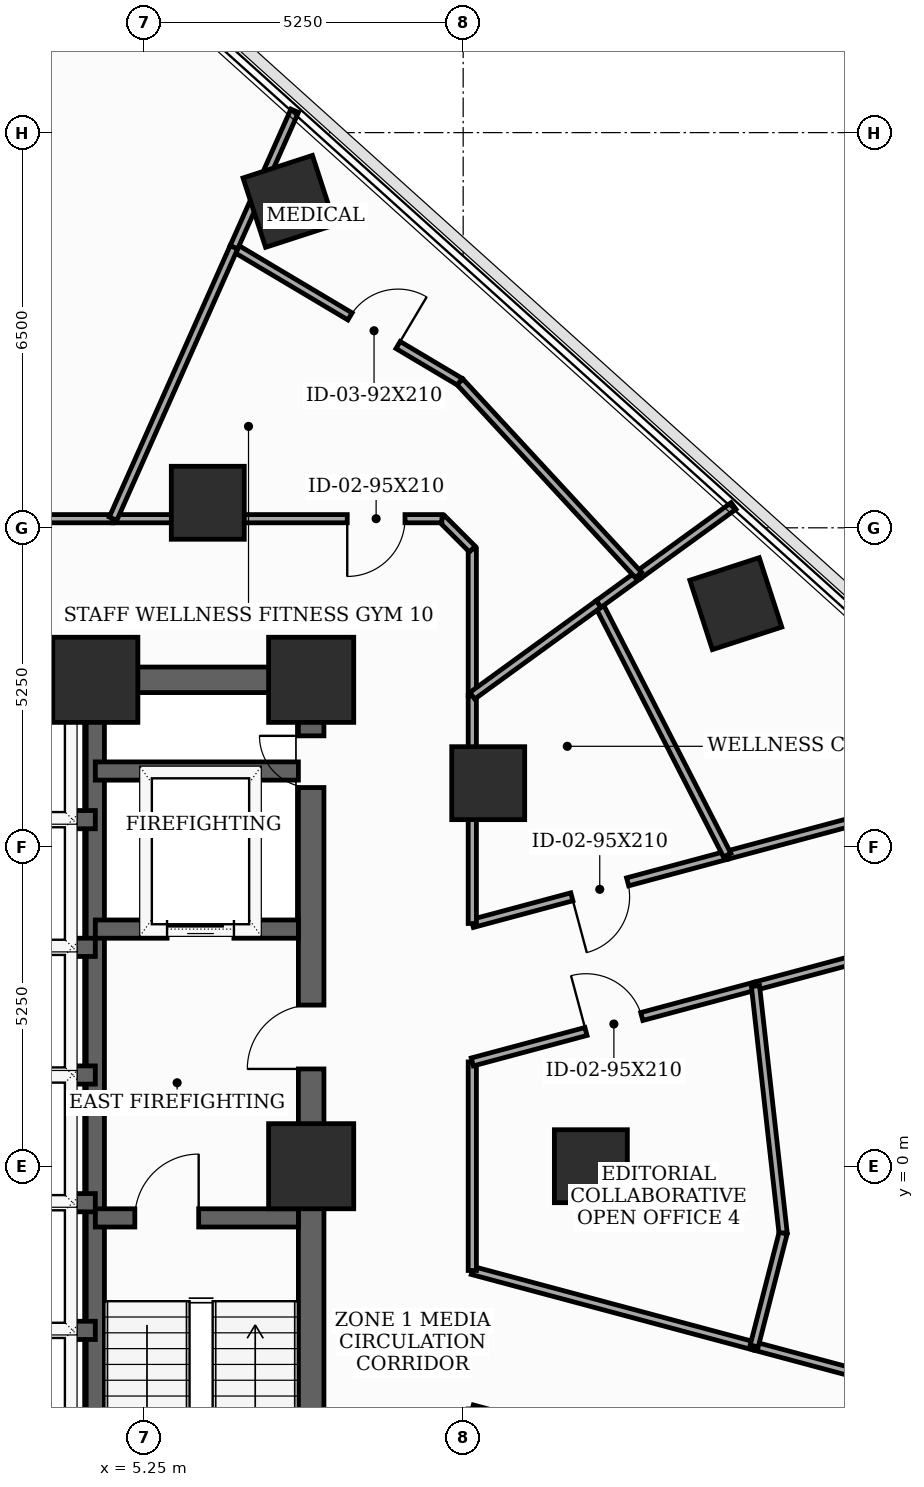
"""IFC4 building model, lengths in metres.
Left out: names, types, materials, properties, quantities, classifications, styles, units other than length and angle.
Written with IfcOpenShell. Run it as: python <this file> out.ifc"""

import sys

from ifc_helpers import new_model, si_unit, direction, frame, frame_2d, origin, origin_2d, place, context, subcontext, project, spatial, rectangle, extrude, element, fill, save


model = new_model("IFC4")
c1 = context("Model", 3, precision=1e-05, world=origin(), true_north=direction((0.0, 1.0)))
c2 = subcontext(c1, "Body", "Model", "MODEL_VIEW")
j1 = project(units=[si_unit("LENGTHUNIT", "METRE"), si_unit("PLANEANGLEUNIT", "RADIAN")], contexts=[c1])
p1 = place(None, origin())
s1 = spatial("IfcSite", under=j1, at=p1, CompositionType="ELEMENT")
p2 = place(p1, origin())
s2 = spatial("IfcBuilding", under=s1, at=p2, CompositionType="ELEMENT")
p3 = place(p2, frame((0.0, 0.0, 105.1)))
s3 = spatial("IfcBuildingStorey", under=s2, at=p3, CompositionType="ELEMENT", Elevation=105.1)
for number, where, z_axis, x_axis in (
    (1, (8.0, 0.0, 0.0), (0.0, 0.0, 1.0), (1.0, 0.0, 0.0)),
    (2, (8.0, 8.0, 0.0), (0.0, 0.0, 1.0), (1.0, 0.0, 0.0)),
    (3, (4.45, 8.0, 0.0), (0.0, 0.0, 1.0), (1.0, 0.0, 0.0)),
):
    element("IfcColumn", number, at=place(p3, frame(where, z_axis=z_axis, x_axis=x_axis)), inside=s3, PredefinedType="COLUMN", context=c2, shape_type="SweptSolid", body=[
        extrude(rectangle(XDim=1.4, YDim=1.4, at=origin_2d()), origin(), (0.0, 0.0, 1.0), 3.7),
    ])
for number, where, z_axis, x_axis in (
    (4, (12.6, 0.0, 0.0), (0.0, 0.0, 1.0), (1.0, 0.0, 0.0)),
    (5, (10.912, 6.3, 0.0), (0.0, 0.0, 1.0), (1.0, 0.0, 0.0)),
    (6, (6.3, 10.912, 0.0), (0.0, 0.0, 1.0), (1.0, 0.0, 0.0)),
    (7, (14.984, 9.252, 0.0), (0.0, 0.0, 1.0), (0.951, 0.309, 0.0)),
    (8, (7.635, 15.869, 0.0), (0.0, 0.0, 1.0), (0.951, 0.309, 0.0)),
):
    element("IfcColumn", number, at=place(p3, frame(where, z_axis=z_axis, x_axis=x_axis)), inside=s3, PredefinedType="COLUMN", context=c2, shape_type="SweptSolid", body=[
        extrude(rectangle(XDim=1.2, YDim=1.2, at=origin_2d()), origin(), (0.0, 0.0, 1.0), 3.7),
    ])
p4 = place(p3, frame((8.0, -8.0, 0.0), z_axis=(0.0, 0.0, 1.0), x_axis=(0.0, 1.0, 0.0)))
e9 = element("IfcWall", 9, at=p4, inside=s3, PredefinedType="SHEAR", context=c2, shape_type="SweptSolid", body=[
    extrude(rectangle(XDim=16.0, YDim=0.42, at=frame_2d((8.0, 0.0))), origin(), (0.0, 0.0, 1.0), 3.5),
])
p5 = place(p4, frame((9.6, 0.0, 0.0)))
e10 = element("IfcOpeningElement", 10, at=p5, cuts=e9, PredefinedType="OPENING", context=c2, shape_type="SweptSolid", body=[
    extrude(rectangle(XDim=1.05, YDim=2.15, at=frame_2d((0.525, 1.075))), frame((0.0, 0.22, 0.0), z_axis=(0.0, -1.0, 0.0), x_axis=(1.0, 0.0, 0.0)), (0.0, 0.0, 1.0), 0.44),
])
p6 = place(p4, frame((14.229, 0.0, 0.0)))
e11 = element("IfcOpeningElement", 11, at=p6, cuts=e9, PredefinedType="OPENING", context=c2, shape_type="SweptSolid", body=[
    extrude(rectangle(XDim=0.85, YDim=2.02, at=frame_2d((0.425, 1.01))), frame((0.0, 0.22, 0.0), z_axis=(0.0, -1.0, 0.0), x_axis=(1.0, 0.0, 0.0)), (0.0, 0.0, 1.0), 0.44),
])
p7 = place(p3, frame((-8.0, 8.0, 0.0), z_axis=(0.0, 0.0, 1.0), x_axis=(1.0, 0.0, 0.0)))
e12 = element("IfcWall", 12, at=p7, inside=s3, PredefinedType="SHEAR", context=c2, shape_type="SweptSolid", body=[
    extrude(rectangle(XDim=16.0, YDim=0.42, at=frame_2d((8.0, 0.0))), origin(), (0.0, 0.0, 1.0), 3.5),
])
p8 = place(p7, frame((7.1, 0.0, 0.0)))
e13 = element("IfcOpeningElement", 13, at=p8, cuts=e12, PredefinedType="OPENING", context=c2, shape_type="SweptSolid", body=[
    extrude(rectangle(XDim=1.8, YDim=2.15, at=frame_2d((0.9, 1.075))), frame((0.0, 0.22, 0.0), z_axis=(0.0, -1.0, 0.0), x_axis=(1.0, 0.0, 0.0)), (0.0, 0.0, 1.0), 0.44),
])
p9 = place(p3, frame((4.45, -7.79, 0.0), z_axis=(0.0, 0.0, 1.0), x_axis=(0.0, 1.0, 0.0)))
e14 = element("IfcWall", 14, at=p9, inside=s3, PredefinedType="SHEAR", context=c2, shape_type="SweptSolid", body=[
    extrude(rectangle(XDim=15.58, YDim=0.3, at=frame_2d((7.79, 0.0))), origin(), (0.0, 0.0, 1.0), 3.5),
])
p10 = place(p3, frame((4.45, -0.85, 0.0), z_axis=(0.0, 0.0, 1.0), x_axis=(1.0, 0.0, 0.0)))
e15 = element("IfcWall", 15, at=p10, inside=s3, PredefinedType="SHEAR", context=c2, shape_type="SweptSolid", body=[
    extrude(rectangle(XDim=3.34, YDim=0.3, at=frame_2d((1.67, 0.0))), origin(), (0.0, 0.0, 1.0), 3.5),
])
p11 = place(p10, frame((0.65, 0.0, 0.0)))
e16 = element("IfcOpeningElement", 16, at=p11, cuts=e15, PredefinedType="OPENING", context=c2, shape_type="SweptSolid", body=[
    extrude(rectangle(XDim=1.05, YDim=2.15, at=frame_2d((0.525, 1.075))), frame((0.0, 0.16, 0.0), z_axis=(0.0, -1.0, 0.0), x_axis=(1.0, 0.0, 0.0)), (0.0, 0.0, 1.0), 0.32),
])
p12 = place(p3, frame((4.45, 3.9, 0.0), z_axis=(0.0, 0.0, 1.0), x_axis=(1.0, 0.0, 0.0)))
e17 = element("IfcWall", 17, at=p12, inside=s3, PredefinedType="SHEAR", context=c2, shape_type="SweptSolid", body=[
    extrude(rectangle(XDim=3.34, YDim=0.3, at=frame_2d((1.67, 0.0))), origin(), (0.0, 0.0, 1.0), 3.5),
])
p13 = place(p12, frame((1.18, 0.0, 0.0)))
e18 = element("IfcOpeningElement", 18, at=p13, cuts=e17, PredefinedType="OPENING", context=c2, shape_type="SweptSolid", body=[
    extrude(rectangle(XDim=1.1, YDim=2.1, at=frame_2d((0.55, 1.05))), frame((0.0, 0.16, 0.0), z_axis=(0.0, -1.0, 0.0), x_axis=(1.0, 0.0, 0.0)), (0.0, 0.0, 1.0), 0.32),
])
p14 = place(p3, frame((4.45, 6.5, 0.0), z_axis=(0.0, 0.0, 1.0), x_axis=(1.0, 0.0, 0.0)))
e19 = element("IfcWall", 19, at=p14, inside=s3, PredefinedType="SHEAR", context=c2, shape_type="SweptSolid", body=[
    extrude(rectangle(XDim=3.34, YDim=0.3, at=frame_2d((1.67, 0.0))), origin(), (0.0, 0.0, 1.0), 3.5),
])
for number, where, z_axis, x_axis in (
    (20, (1.68, 1.5, 0.0), (0.0, 0.0, 1.0), (1.0, 0.0, 0.0)),
    (21, (1.68, 3.6, 0.0), (0.0, 0.0, 1.0), (1.0, 0.0, 0.0)),
    (22, (1.68, 5.7, 0.0), (0.0, 0.0, 1.0), (1.0, 0.0, 0.0)),
    (23, (1.68, -2.7, 0.0), (0.0, 0.0, 1.0), (1.0, 0.0, 0.0)),
    (24, (1.68, -0.6, 0.0), (0.0, 0.0, 1.0), (1.0, 0.0, 0.0)),
):
    element("IfcWall", number, at=place(p3, frame(where, z_axis=z_axis, x_axis=x_axis)), inside=s3, PredefinedType="SHEAR", context=c2, shape_type="SweptSolid", body=[
        extrude(rectangle(XDim=2.77, YDim=0.3, at=frame_2d((1.385, 0.0))), origin(), (0.0, 0.0, 1.0), 3.5),
    ])
p15 = place(p3, frame((22.115, -4.787, 0.0), z_axis=(0.0, 0.0, 1.0), x_axis=(-0.965917838763, 0.258848853116, 0.0)))
e25 = element("IfcWall", 25, at=p15, inside=s3, PredefinedType="PARTITIONING", context=c2, shape_type="SweptSolid", body=[
    extrude(rectangle(XDim=7.07, YDim=0.135, at=frame_2d((3.535, 0.0))), origin(), (0.0, 0.0, 1.0), 2.935),
])
p16 = place(p15, frame((3.06, 0.0, 0.0)))
e26 = element("IfcOpeningElement", 26, at=p16, cuts=e25, PredefinedType="OPENING", context=c2, shape_type="SweptSolid", body=[
    extrude(rectangle(XDim=0.95, YDim=2.1, at=frame_2d((0.475, 1.05))), frame((0.0, 0.077, 0.0), z_axis=(0.0, -1.0, 0.0), x_axis=(1.0, 0.0, 0.0)), (0.0, 0.0, 1.0), 0.155),
])
p17 = place(p3, frame((15.307, 2.963, 0.0), z_axis=(0.0, 0.0, 1.0), x_axis=(0.965966165677, 0.258668449501, 0.0)))
e27 = element("IfcWall", 27, at=p17, inside=s3, PredefinedType="PARTITIONING", context=c2, shape_type="SweptSolid", body=[
    extrude(rectangle(XDim=3.248, YDim=0.135, at=frame_2d((1.624, 0.0))), origin(), (0.0, 0.0, 1.0), 3.125),
])
p18 = place(p3, frame((17.875, 5.928, 0.0), z_axis=(0.0, 0.0, 1.0), x_axis=(-0.96597893007, -0.258620777704, 0.0)))
e28 = element("IfcWall", 28, at=p18, inside=s3, PredefinedType="PARTITIONING", context=c2, shape_type="SweptSolid", body=[
    extrude(rectangle(XDim=3.14, YDim=0.135, at=frame_2d((1.57, 0.0))), origin(), (0.0, 0.0, 1.0), 3.125),
])
p19 = place(p3, frame((10.65, -3.992, 0.0), z_axis=(0.0, 0.0, 1.0), x_axis=(0.965925146235, -0.258821583086, 0.0)))
e29 = element("IfcWall", 29, at=p19, inside=s3, PredefinedType="PARTITIONING", context=c2, shape_type="SweptSolid", body=[
    extrude(rectangle(XDim=4.234, YDim=0.135, at=frame_2d((2.117, 0.0))), origin(), (0.0, 0.0, 1.0), 2.785),
])
p20 = place(p3, frame((15.286, -2.957, 0.0), z_axis=(0.0, 0.0, 1.0), x_axis=(-0.965939651128, 0.258767444588, 0.0)))
e30 = element("IfcWall", 30, at=p20, inside=s3, PredefinedType="PARTITIONING", context=c2, shape_type="SweptSolid", body=[
    extrude(rectangle(XDim=4.8, YDim=0.135, at=frame_2d((2.4, 0.0))), origin(), (0.0, 0.0, 1.0), 2.785),
])
p21 = place(p3, frame((10.65, -1.715, 0.0), z_axis=(0.0, 0.0, 1.0), x_axis=(0.0, 1.0, 0.0)))
e31 = element("IfcWall", 31, at=p21, inside=s3, PredefinedType="PARTITIONING", context=c2, shape_type="SweptSolid", body=[
    extrude(rectangle(XDim=3.43, YDim=0.135, at=frame_2d((1.715, 0.0))), origin(), (0.0, 0.0, 1.0), 2.785),
])
p22 = place(p3, frame((10.65, 1.715, 0.0), z_axis=(0.0, 0.0, 1.0), x_axis=(0.965927482723, 0.258812863129, 0.0)))
e32 = element("IfcWall", 32, at=p22, inside=s3, PredefinedType="PARTITIONING", context=c2, shape_type="SweptSolid", body=[
    extrude(rectangle(XDim=4.821, YDim=0.135, at=frame_2d((2.411, 0.0))), origin(), (0.0, 0.0, 1.0), 2.785),
])
p23 = place(p22, frame((1.936, 0.0, 0.0)))
e33 = element("IfcOpeningElement", 33, at=p23, cuts=e32, PredefinedType="OPENING", context=c2, shape_type="SweptSolid", body=[
    extrude(rectangle(XDim=0.95, YDim=2.1, at=frame_2d((0.475, 1.05))), frame((0.0, 0.077, 0.0), z_axis=(0.0, -1.0, 0.0), x_axis=(1.0, 0.0, 0.0)), (0.0, 0.0, 1.0), 0.155),
])
p24 = place(p3, frame((14.842, 5.116, 0.0), z_axis=(0.0, 0.0, 1.0), x_axis=(-0.965883000332, -0.258978820891, 0.0)))
e34 = element("IfcWall", 34, at=p24, inside=s3, PredefinedType="PARTITIONING", context=c2, shape_type="SweptSolid", body=[
    extrude(rectangle(XDim=4.34, YDim=0.135, at=frame_2d((2.17, 0.0))), origin(), (0.0, 0.0, 1.0), 2.785),
])
p25 = place(p24, frame((1.695, 0.0, 0.0)))
e35 = element("IfcOpeningElement", 35, at=p25, cuts=e34, PredefinedType="OPENING", context=c2, shape_type="SweptSolid", body=[
    extrude(rectangle(XDim=0.95, YDim=2.1, at=frame_2d((0.475, 1.05))), frame((0.0, 0.077, 0.0), z_axis=(0.0, -1.0, 0.0), x_axis=(1.0, 0.0, 0.0)), (0.0, 0.0, 1.0), 0.155),
])
p26 = place(p3, frame((10.65, 3.992, 0.0), z_axis=(0.0, 0.0, 1.0), x_axis=(0.0, 1.0, 0.0)))
e36 = element("IfcWall", 36, at=p26, inside=s3, PredefinedType="PARTITIONING", context=c2, shape_type="SweptSolid", body=[
    extrude(rectangle(XDim=3.746, YDim=0.135, at=frame_2d((1.873, 0.0))), origin(), (0.0, 0.0, 1.0), 2.785),
])
p27 = place(p3, frame((10.65, 7.738, 0.0), z_axis=(0.0, 0.0, 1.0), x_axis=(0.0, 1.0, 0.0)))
e37 = element("IfcWall", 37, at=p27, inside=s3, PredefinedType="PARTITIONING", context=c2, shape_type="SweptSolid", body=[
    extrude(rectangle(XDim=2.412, YDim=0.135, at=frame_2d((1.206, 0.0))), origin(), (0.0, 0.0, 1.0), 3.125),
])
p28 = place(p3, frame((10.65, 10.15, 0.0), z_axis=(0.0, 0.0, 1.0), x_axis=(-0.707106781187, 0.707106781187, 0.0)))
e38 = element("IfcWall", 38, at=p28, inside=s3, PredefinedType="PARTITIONING", context=c2, shape_type="SweptSolid", body=[
    extrude(rectangle(XDim=0.707, YDim=0.135, at=frame_2d((0.354, 0.0))), origin(), (0.0, 0.0, 1.0), 3.125),
])
p29 = place(p3, frame((10.15, 10.65, 0.0), z_axis=(0.0, 0.0, 1.0), x_axis=(-1.0, 0.0, 0.0)))
e39 = element("IfcWall", 39, at=p29, inside=s3, PredefinedType="PARTITIONING", context=c2, shape_type="SweptSolid", body=[
    extrude(rectangle(XDim=5.408, YDim=0.135, at=frame_2d((2.704, 0.0))), origin(), (0.0, 0.0, 1.0), 2.785),
])
p30 = place(p29, frame((0.607, 0.0, 0.0)))
e40 = element("IfcOpeningElement", 40, at=p30, cuts=e39, PredefinedType="OPENING", context=c2, shape_type="SweptSolid", body=[
    extrude(rectangle(XDim=0.95, YDim=2.1, at=frame_2d((0.475, 1.05))), frame((0.0, 0.077, 0.0), z_axis=(0.0, -1.0, 0.0), x_axis=(1.0, 0.0, 0.0)), (0.0, 0.0, 1.0), 0.155),
])
p31 = place(p3, frame((4.742, 10.65, 0.0), z_axis=(0.0, 0.0, 1.0), x_axis=(-1.0, 0.0, 0.0)))
e41 = element("IfcWall", 41, at=p31, inside=s3, PredefinedType="PARTITIONING", context=c2, shape_type="SweptSolid", body=[
    extrude(rectangle(XDim=10.405, YDim=0.135, at=frame_2d((5.203, 0.0))), origin(), (0.0, 0.0, 1.0), 2.785),
])
p32 = place(p31, frame((5.976, 0.0, 0.0)))
e42 = element("IfcOpeningElement", 42, at=p32, cuts=e41, PredefinedType="OPENING", context=c2, shape_type="SweptSolid", body=[
    extrude(rectangle(XDim=0.95, YDim=2.1, at=frame_2d((0.475, 1.05))), frame((0.0, 0.077, 0.0), z_axis=(0.0, -1.0, 0.0), x_axis=(1.0, 0.0, 0.0)), (0.0, 0.0, 1.0), 0.155),
])
p33 = place(p3, frame((15.307, 2.963, 0.0), z_axis=(0.0, 0.0, 1.0), x_axis=(0.111256918124, -0.99379167745, 0.0)))
e43 = element("IfcWall", 43, at=p33, inside=s3, PredefinedType="PARTITIONING", context=c2, shape_type="SweptSolid", body=[
    extrude(rectangle(XDim=4.09, YDim=0.135, at=frame_2d((2.045, 0.0))), origin(), (0.0, 0.0, 1.0), 2.785),
])
p34 = place(p3, frame((15.762, -1.102, 0.0), z_axis=(0.0, 0.0, 1.0), x_axis=(-0.248590042538, -0.968608791386, 0.0)))
e44 = element("IfcWall", 44, at=p34, inside=s3, PredefinedType="PARTITIONING", context=c2, shape_type="SweptSolid", body=[
    extrude(rectangle(XDim=1.915, YDim=0.135, at=frame_2d((0.958, 0.0))), origin(), (0.0, 0.0, 1.0), 3.5),
])
p35 = place(p3, frame((12.726, 9.246, 0.0), z_axis=(0.0, 0.0, 1.0), x_axis=(0.455967351564, -0.889996502413, 0.0)))
e45 = element("IfcWall", 45, at=p35, inside=s3, PredefinedType="PARTITIONING", context=c2, shape_type="SweptSolid", body=[
    extrude(rectangle(XDim=4.641, YDim=0.135, at=frame_2d((2.32, 0.0))), origin(), (0.0, 0.0, 1.0), 2.785),
])
p36 = place(p3, frame((14.947, 10.86, 0.0), z_axis=(0.0, 0.0, 1.0), x_axis=(-0.809090948161, -0.58768345017, 0.0)))
e46 = element("IfcWall", 46, at=p36, inside=s3, PredefinedType="PARTITIONING", context=c2, shape_type="SweptSolid", body=[
    extrude(rectangle(XDim=1.933, YDim=0.135, at=frame_2d((0.967, 0.0))), origin(), (0.0, 0.0, 1.0), 2.935),
])
p37 = place(p3, frame((13.383, 9.724, 0.0), z_axis=(0.0, 0.0, 1.0), x_axis=(-0.808606124949, -0.588350350297, 0.0)))
e47 = element("IfcWall", 47, at=p37, inside=s3, PredefinedType="PARTITIONING", context=c2, shape_type="SweptSolid", body=[
    extrude(rectangle(XDim=0.812, YDim=0.135, at=frame_2d((0.406, 0.0))), origin(), (0.0, 0.0, 1.0), 3.5),
])
p38 = place(p3, frame((12.726, 9.246, 0.0), z_axis=(0.0, 0.0, 1.0), x_axis=(-0.80908565166, -0.587690742039, 0.0)))
e48 = element("IfcWall", 48, at=p38, inside=s3, PredefinedType="PARTITIONING", context=c2, shape_type="SweptSolid", body=[
    extrude(rectangle(XDim=2.566, YDim=0.135, at=frame_2d((1.283, 0.0))), origin(), (0.0, 0.0, 1.0), 3.125),
])
p39 = place(p3, frame((6.729, 15.113, 0.0), z_axis=(0.0, 0.0, 1.0), x_axis=(0.859389125663, -0.511322139841, 0.0)))
e49 = element("IfcWall", 49, at=p39, inside=s3, PredefinedType="PARTITIONING", context=c2, shape_type="SweptSolid", body=[
    extrude(rectangle(XDim=4.326, YDim=0.135, at=frame_2d((2.163, 0.0))), origin(), (0.0, 0.0, 1.0), 2.785),
])
p40 = place(p39, frame((2.222, 0.0, 0.0)))
e50 = element("IfcOpeningElement", 50, at=p40, cuts=e49, PredefinedType="OPENING", context=c2, shape_type="SweptSolid", body=[
    extrude(rectangle(XDim=0.92, YDim=2.1, at=frame_2d((0.46, 1.05))), frame((0.0, 0.077, 0.0), z_axis=(0.0, -1.0, 0.0), x_axis=(1.0, 0.0, 0.0)), (0.0, 0.0, 1.0), 0.155),
])
p41 = place(p3, frame((10.447, 12.901, 0.0), z_axis=(0.0, 0.0, 1.0), x_axis=(0.678734730072, -0.734383527997, 0.0)))
e51 = element("IfcWall", 51, at=p41, inside=s3, PredefinedType="PARTITIONING", context=c2, shape_type="SweptSolid", body=[
    extrude(rectangle(XDim=4.326, YDim=0.135, at=frame_2d((2.163, 0.0))), origin(), (0.0, 0.0, 1.0), 3.5),
])
p42 = place(p3, frame((7.729, 17.359, 0.0), z_axis=(0.0, 0.0, 1.0), x_axis=(-0.406728032322, -0.913549291349, 0.0)))
e52 = element("IfcWall", 52, at=p42, inside=s3, PredefinedType="PARTITIONING", context=c2, shape_type="SweptSolid", body=[
    extrude(rectangle(XDim=2.459, YDim=0.135, at=frame_2d((1.229, 0.0))), origin(), (0.0, 0.0, 1.0), 2.935),
])
p43 = place(p3, frame((6.729, 15.113, 0.0), z_axis=(0.0, 0.0, 1.0), x_axis=(-0.406727234472, -0.913549646565, 0.0)))
e53 = element("IfcWall", 53, at=p43, inside=s3, PredefinedType="PARTITIONING", context=c2, shape_type="SweptSolid", body=[
    extrude(rectangle(XDim=4.885, YDim=0.135, at=frame_2d((2.443, 0.0))), origin(), (0.0, 0.0, 1.0), 2.785),
])
p44 = place(p5, origin())
e54 = element("IfcDoor", 54, at=p44, inside=s3, OperationType="SINGLE_SWING_LEFT", PredefinedType="DOOR", context=c2, shape_type="SweptSolid", body=[
    extrude(rectangle(XDim=1.05, YDim=2.15, at=frame_2d((0.525, 1.075))), frame((0.0, 0.025, 0.0), z_axis=(0.0, -1.0, 0.0), x_axis=(1.0, 0.0, 0.0)), (0.0, 0.0, 1.0), 0.05),
])
fill(e10, e54)
p45 = place(p6, origin())
e55 = element("IfcDoor", 55, at=p45, inside=s3, OperationType="SINGLE_SWING_RIGHT", PredefinedType="TRAPDOOR", context=c2, shape_type="SweptSolid", body=[
    extrude(rectangle(XDim=0.85, YDim=2.02, at=frame_2d((0.425, 1.01))), frame((0.0, 0.025, 0.0), z_axis=(0.0, -1.0, 0.0), x_axis=(1.0, 0.0, 0.0)), (0.0, 0.0, 1.0), 0.05),
])
fill(e11, e55)
p46 = place(p11, origin())
e56 = element("IfcDoor", 56, at=p46, inside=s3, OperationType="SINGLE_SWING_RIGHT", PredefinedType="DOOR", context=c2, shape_type="SweptSolid", body=[
    extrude(rectangle(XDim=1.05, YDim=2.15, at=frame_2d((0.525, 1.075))), frame((0.0, 0.025, 0.0), z_axis=(0.0, -1.0, 0.0), x_axis=(1.0, 0.0, 0.0)), (0.0, 0.0, 1.0), 0.05),
])
fill(e16, e56)
p47 = place(p13, origin())
e57 = element("IfcDoor", 57, at=p47, inside=s3, OperationType="SLIDING_TO_LEFT", PredefinedType="DOOR", context=c2, shape_type="SweptSolid", body=[
    extrude(rectangle(XDim=1.1, YDim=2.1, at=frame_2d((0.55, 1.05))), frame((0.0, 0.025, 0.0), z_axis=(0.0, -1.0, 0.0), x_axis=(1.0, 0.0, 0.0)), (0.0, 0.0, 1.0), 0.05),
])
fill(e18, e57)
p48 = place(p23, origin())
e58 = element("IfcDoor", 58, at=p48, inside=s3, OperationType="SINGLE_SWING_LEFT", PredefinedType="DOOR", context=c2, shape_type="SweptSolid", body=[
    extrude(rectangle(XDim=0.95, YDim=2.1, at=frame_2d((0.475, 1.05))), frame((0.0, 0.025, 0.0), z_axis=(0.0, -1.0, 0.0), x_axis=(1.0, 0.0, 0.0)), (0.0, 0.0, 1.0), 0.05),
])
fill(e33, e58)
p49 = place(p25, origin())
e59 = element("IfcDoor", 59, at=p49, inside=s3, OperationType="SINGLE_SWING_RIGHT", PredefinedType="DOOR", context=c2, shape_type="SweptSolid", body=[
    extrude(rectangle(XDim=0.95, YDim=2.1, at=frame_2d((0.475, 1.05))), frame((0.0, 0.025, 0.0), z_axis=(0.0, -1.0, 0.0), x_axis=(1.0, 0.0, 0.0)), (0.0, 0.0, 1.0), 0.05),
])
fill(e35, e59)
p50 = place(p30, origin())
e60 = element("IfcDoor", 60, at=p50, inside=s3, OperationType="SINGLE_SWING_RIGHT", PredefinedType="DOOR", context=c2, shape_type="SweptSolid", body=[
    extrude(rectangle(XDim=0.95, YDim=2.1, at=frame_2d((0.475, 1.05))), frame((0.0, 0.025, 0.0), z_axis=(0.0, -1.0, 0.0), x_axis=(1.0, 0.0, 0.0)), (0.0, 0.0, 1.0), 0.05),
])
fill(e40, e60)
p51 = place(p40, origin())
e61 = element("IfcDoor", 61, at=p51, inside=s3, OperationType="SINGLE_SWING_RIGHT", PredefinedType="DOOR", context=c2, shape_type="SweptSolid", body=[
    extrude(rectangle(XDim=0.92, YDim=2.1, at=frame_2d((0.46, 1.05))), frame((0.0, 0.025, 0.0), z_axis=(0.0, -1.0, 0.0), x_axis=(1.0, 0.0, 0.0)), (0.0, 0.0, 1.0), 0.05),
])
fill(e50, e61)
save(model, sys.argv[1])
